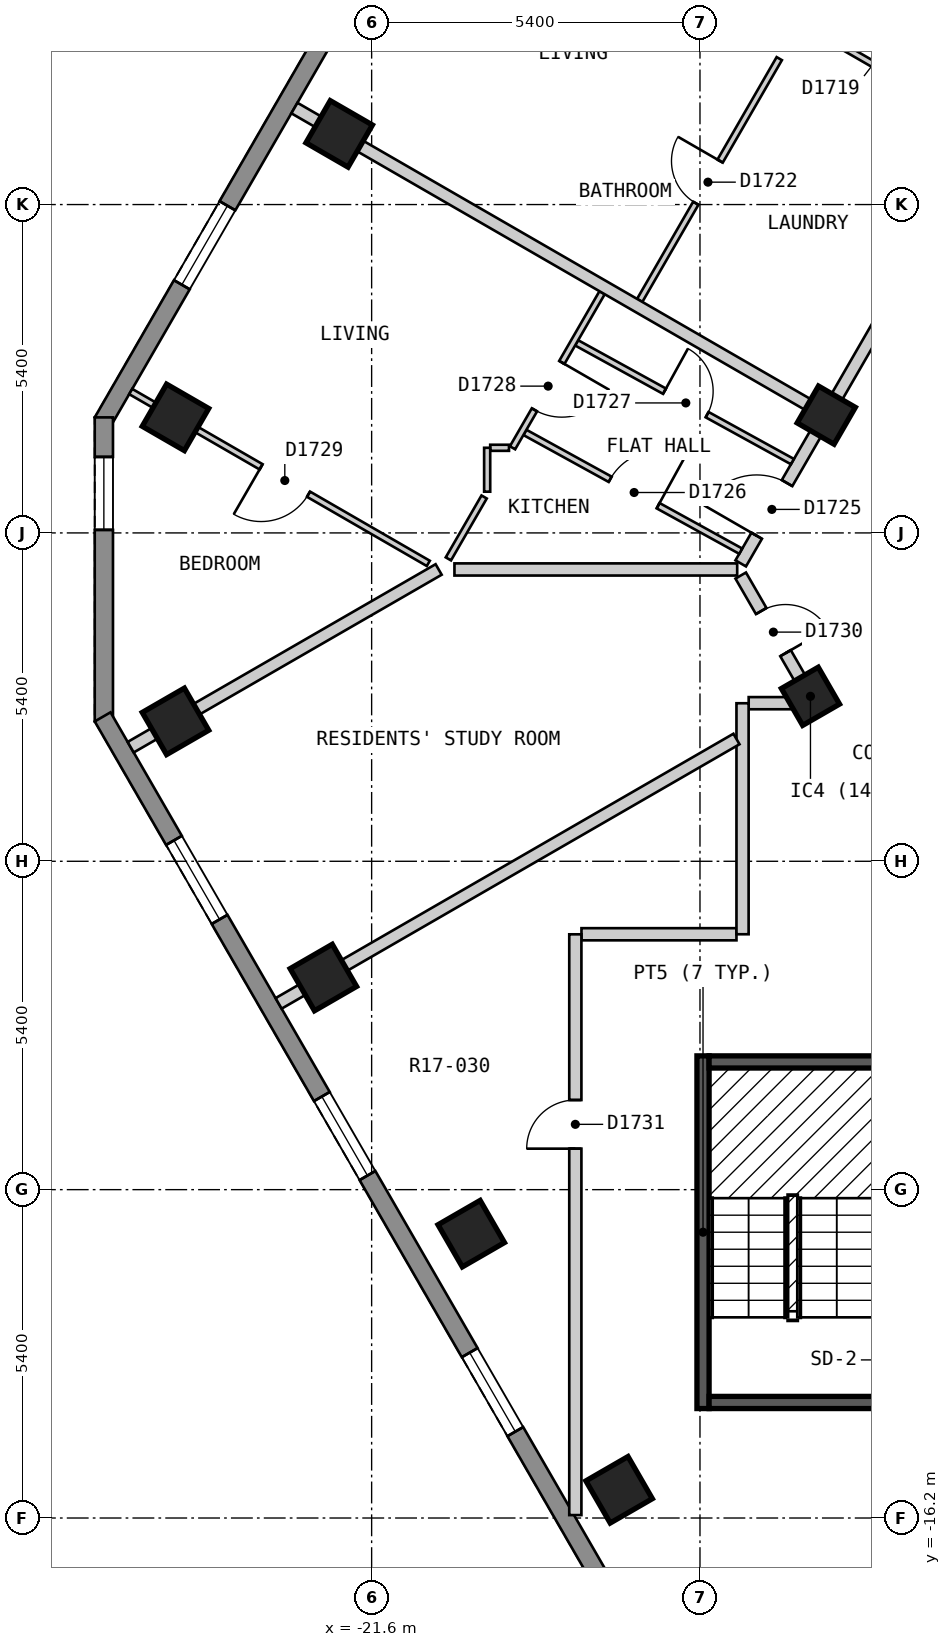
"""IFC4 building model, lengths in metres.
Left out: names, types, materials, properties, quantities, classifications, styles, units other than length and angle.
Written with IfcOpenShell. Run it as: python <this file> out.ifc"""

import sys

from ifc_helpers import new_model, si_unit, direction, frame, frame_2d, origin, origin_2d, place, context, subcontext, project, spatial, polyline, rectangle, outline, extrude, element, fill, save


model = new_model("IFC4")
c1 = context("Model", 3, precision=1e-05, world=origin(), true_north=direction((0.0, 1.0)))
c2 = subcontext(c1, "Body", "Model", "MODEL_VIEW")
j1 = project(units=[si_unit("LENGTHUNIT", "METRE"), si_unit("PLANEANGLEUNIT", "RADIAN")], contexts=[c1])
p1 = place(None, origin())
s1 = spatial("IfcSite", under=j1, at=p1, CompositionType="ELEMENT")
p2 = place(p1, origin())
s2 = spatial("IfcBuilding", under=s1, at=p2, CompositionType="ELEMENT")
p3 = place(p2, frame((0.0, 0.0, 187.2)))
s3 = spatial("IfcBuildingStorey", under=s2, at=p3, CompositionType="ELEMENT", Elevation=187.2)
for number, where, z_axis, x_axis in (
    (1, (-22.134, 6.562, 0.0), (0.0, 0.0, 1.0), (-0.5, -0.866, 0.0)),
    (2, (-24.826, 1.9, 0.0), (0.0, 0.0, 1.0), (-0.5, -0.866, 0.0)),
    (3, (-24.826, -3.099, 0.0), (0.0, 0.0, 1.0), (0.5, -0.866, 0.0)),
    (4, (-22.394, -7.312, 0.0), (0.0, 0.0, 1.0), (0.5, -0.866, 0.0)),
    (5, (-19.962, -11.524, 0.0), (0.0, 0.0, 1.0), (0.5, -0.866, 0.0)),
    (6, (-17.53, -15.736, 0.0), (0.0, 0.0, 1.0), (0.5, -0.866, 0.0)),
):
    element("IfcColumn", number, at=place(p3, frame(where, z_axis=z_axis, x_axis=x_axis)), inside=s3, PredefinedType="COLUMN", context=c2, shape_type="SweptSolid", body=[
        extrude(rectangle(XDim=0.8, YDim=0.8, at=origin_2d()), origin(), (0.0, 0.0, 1.0), 3.0),
    ])
for number, where, z_axis, x_axis in (
    (7, (-14.383, -2.687, 0.0), (0.0, 0.0, 1.0), (0.5, -0.866, 0.0)),
    (8, (-14.123, 1.937, 0.0), (0.0, 0.0, 1.0), (-0.5, -0.866, 0.0)),
):
    element("IfcColumn", number, at=place(p3, frame(where, z_axis=z_axis, x_axis=x_axis)), inside=s3, PredefinedType="COLUMN", context=c2, shape_type="SweptSolid", body=[
        extrude(rectangle(XDim=0.7, YDim=0.7, at=origin_2d()), origin(), (0.0, 0.0, 1.0), 3.0),
    ])
p4 = place(p3, frame((-14.592, 21.625, 0.0), z_axis=(0.0, 0.0, 1.0), x_axis=(-0.500010537973, -0.866019319597, 0.0)))
e9 = element("IfcWall", 9, at=p4, inside=s3, PredefinedType="SOLIDWALL", context=c2, shape_type="SweptSolid", body=[
    extrude(outline(polyline([(0.0, -0.15), (22.863, -0.15), (22.783, 0.15), (0.08, 0.15), (0.0, -0.15)])), origin(), (0.0, 0.0, 1.0), 2.7),
])
p5 = place(p4, frame((2.606, 0.0, 0.15)))
e10 = element("IfcOpeningElement", 10, at=p5, cuts=e9, PredefinedType="OPENING", context=c2, shape_type="SweptSolid", body=[
    extrude(rectangle(XDim=1.5, YDim=2.1, at=frame_2d((0.75, 1.05))), frame((0.0, 0.16, 0.0), z_axis=(0.0, -1.0, 0.0), x_axis=(1.0, 0.0, 0.0)), (0.0, 0.0, 1.0), 0.32),
])
p6 = place(p4, frame((7.99, 0.0, 0.15)))
e11 = element("IfcOpeningElement", 11, at=p6, cuts=e9, PredefinedType="OPENING", context=c2, shape_type="SweptSolid", body=[
    extrude(rectangle(XDim=1.5, YDim=2.1, at=frame_2d((0.75, 1.05))), frame((0.0, 0.16, 0.0), z_axis=(0.0, -1.0, 0.0), x_axis=(1.0, 0.0, 0.0)), (0.0, 0.0, 1.0), 0.32),
])
p7 = place(p4, frame((13.373, 0.0, 0.15)))
e12 = element("IfcOpeningElement", 12, at=p7, cuts=e9, PredefinedType="OPENING", context=c2, shape_type="SweptSolid", body=[
    extrude(rectangle(XDim=1.5, YDim=2.1, at=frame_2d((0.75, 1.05))), frame((0.0, 0.16, 0.0), z_axis=(0.0, -1.0, 0.0), x_axis=(1.0, 0.0, 0.0)), (0.0, 0.0, 1.0), 0.32),
])
p8 = place(p4, frame((18.758, 0.0, 0.15)))
e13 = element("IfcOpeningElement", 13, at=p8, cuts=e9, PredefinedType="OPENING", context=c2, shape_type="SweptSolid", body=[
    extrude(rectangle(XDim=1.5, YDim=2.1, at=frame_2d((0.75, 1.05))), frame((0.0, 0.16, 0.0), z_axis=(0.0, -1.0, 0.0), x_axis=(1.0, 0.0, 0.0)), (0.0, 0.0, 1.0), 0.32),
])
p9 = place(p3, frame((-26.004, 1.9, 0.0), z_axis=(0.0, 0.0, 1.0), x_axis=(0.0, -1.0, 0.0)))
e14 = element("IfcWall", 14, at=p9, inside=s3, PredefinedType="SOLIDWALL", context=c2, shape_type="SweptSolid", body=[
    extrude(outline(polyline([(0.0, -0.15), (5.0, -0.15), (4.92, 0.15), (0.08, 0.15), (0.0, -0.15)])), origin(), (0.0, 0.0, 1.0), 2.7),
])
p10 = place(p9, frame((0.65, 0.0, 0.15)))
e15 = element("IfcOpeningElement", 15, at=p10, cuts=e14, PredefinedType="OPENING", context=c2, shape_type="SweptSolid", body=[
    extrude(rectangle(XDim=1.2, YDim=2.1, at=frame_2d((0.6, 1.05))), frame((0.0, 0.16, 0.0), z_axis=(0.0, -1.0, 0.0), x_axis=(1.0, 0.0, 0.0)), (0.0, 0.0, 1.0), 0.32),
])
p11 = place(p3, frame((-26.024, -3.025, 0.0), z_axis=(0.0, 0.0, 1.0), x_axis=(0.500018670445, -0.86601462413, 0.0)))
e16 = element("IfcWall", 16, at=p11, inside=s3, PredefinedType="SOLIDWALL", context=c2, shape_type="SweptSolid", body=[
    extrude(outline(polyline([(0.0, -0.15), (20.785, -0.15), (20.705, 0.15), (0.08, 0.15), (0.0, -0.15)])), origin(), (0.0, 0.0, 1.0), 2.7),
])
p12 = place(p11, frame((2.346, 0.0, 0.15)))
e17 = element("IfcOpeningElement", 17, at=p12, cuts=e16, PredefinedType="OPENING", context=c2, shape_type="SweptSolid", body=[
    extrude(rectangle(XDim=1.5, YDim=2.1, at=frame_2d((0.75, 1.05))), frame((0.0, 0.16, 0.0), z_axis=(0.0, -1.0, 0.0), x_axis=(1.0, 0.0, 0.0)), (0.0, 0.0, 1.0), 0.32),
])
p13 = place(p11, frame((7.21, 0.0, 0.15)))
e18 = element("IfcOpeningElement", 18, at=p13, cuts=e16, PredefinedType="OPENING", context=c2, shape_type="SweptSolid", body=[
    extrude(rectangle(XDim=1.5, YDim=2.1, at=frame_2d((0.75, 1.05))), frame((0.0, 0.16, 0.0), z_axis=(0.0, -1.0, 0.0), x_axis=(1.0, 0.0, 0.0)), (0.0, 0.0, 1.0), 0.32),
])
p14 = place(p11, frame((12.073, 0.0, 0.15)))
e19 = element("IfcOpeningElement", 19, at=p14, cuts=e16, PredefinedType="OPENING", context=c2, shape_type="SweptSolid", body=[
    extrude(rectangle(XDim=1.5, YDim=2.1, at=frame_2d((0.75, 1.05))), frame((0.0, 0.16, 0.0), z_axis=(0.0, -1.0, 0.0), x_axis=(1.0, 0.0, 0.0)), (0.0, 0.0, 1.0), 0.32),
])
p15 = place(p11, frame((16.938, 0.0, 0.15)))
e20 = element("IfcOpeningElement", 20, at=p15, cuts=e16, PredefinedType="OPENING", context=c2, shape_type="SweptSolid", body=[
    extrude(rectangle(XDim=1.5, YDim=2.1, at=frame_2d((0.75, 1.05))), frame((0.0, 0.16, 0.0), z_axis=(0.0, -1.0, 0.0), x_axis=(1.0, 0.0, 0.0)), (0.0, 0.0, 1.0), 0.32),
])
p16 = place(p3, frame((-15.53, -0.701, 0.0), z_axis=(0.0, 0.0, 1.0), x_axis=(0.499972710878, -0.866041158593, 0.0)))
e21 = element("IfcWall", 21, at=p16, inside=s3, PredefinedType="PARTITIONING", context=c2, shape_type="SweptSolid", body=[
    extrude(rectangle(XDim=2.308, YDim=0.2, at=frame_2d((1.154, 0.0))), origin(), (0.0, 0.0, 1.0), 2.7),
])
p17 = place(p16, frame((0.674, 0.0, 0.0)))
e22 = element("IfcOpeningElement", 22, at=p17, cuts=e21, PredefinedType="OPENING", context=c2, shape_type="SweptSolid", body=[
    extrude(rectangle(XDim=0.8, YDim=2.1, at=frame_2d((0.4, 1.05))), frame((0.0, 0.11, 0.0), z_axis=(0.0, -1.0, 0.0), x_axis=(1.0, 0.0, 0.0)), (0.0, 0.0, 1.0), 0.22),
])
p18 = place(p3, frame((-18.149, -6.6, 0.0), z_axis=(0.0, 0.0, 1.0), x_axis=(1.0, 0.0, 0.0)))
e23 = element("IfcWall", 23, at=p18, inside=s3, PredefinedType="PARTITIONING", context=c2, shape_type="SweptSolid", body=[
    extrude(rectangle(XDim=2.549, YDim=0.2, at=frame_2d((1.274, 0.0))), origin(), (0.0, 0.0, 1.0), 2.7),
])
p19 = place(p3, frame((-15.399, -2.8, 0.0), z_axis=(0.0, 0.0, 1.0), x_axis=(1.0, 0.0, 0.0)))
e24 = element("IfcWall", 24, at=p19, inside=s3, PredefinedType="PARTITIONING", context=c2, shape_type="SweptSolid", body=[
    extrude(rectangle(XDim=1.081, YDim=0.2, at=frame_2d((0.541, 0.0))), origin(), (0.0, 0.0, 1.0), 2.7),
])
p20 = place(p3, frame((-15.53, -0.501, 0.0), z_axis=(0.0, 0.0, 1.0), x_axis=(0.499952498232, 0.866052827206, 0.0)))
e25 = element("IfcWall", 25, at=p20, inside=s3, PredefinedType="PARTITIONING", context=c2, shape_type="SweptSolid", body=[
    extrude(rectangle(XDim=9.585, YDim=0.2, at=frame_2d((4.792, 0.0))), origin(), (0.0, 0.0, 1.0), 2.7),
])
p21 = place(p20, frame((0.525, 0.0, 0.0)))
e26 = element("IfcOpeningElement", 26, at=p21, cuts=e25, PredefinedType="OPENING", context=c2, shape_type="SweptSolid", body=[
    extrude(rectangle(XDim=1.0, YDim=2.1, at=frame_2d((0.5, 1.05))), frame((0.0, 0.11, 0.0), z_axis=(0.0, -1.0, 0.0), x_axis=(1.0, 0.0, 0.0)), (0.0, 0.0, 1.0), 0.22),
])
p22 = place(p3, frame((-15.5, -6.6, 0.0), z_axis=(0.0, 0.0, 1.0), x_axis=(0.0, 1.0, 0.0)))
e27 = element("IfcWall", 27, at=p22, inside=s3, PredefinedType="PARTITIONING", context=c2, shape_type="SweptSolid", body=[
    extrude(rectangle(XDim=3.799, YDim=0.2, at=frame_2d((1.899, 0.0))), origin(), (0.0, 0.0, 1.0), 2.7),
])
p23 = place(p3, frame((-18.25, -16.152, 0.0), z_axis=(0.0, 0.0, 1.0), x_axis=(0.0, 1.0, 0.0)))
e28 = element("IfcWall", 28, at=p23, inside=s3, PredefinedType="PARTITIONING", context=c2, shape_type="SweptSolid", body=[
    extrude(rectangle(XDim=9.551, YDim=0.2, at=frame_2d((4.775, 0.0))), origin(), (0.0, 0.0, 1.0), 2.7),
])
p24 = place(p23, frame((6.026, 0.0, 0.0)))
e29 = element("IfcOpeningElement", 29, at=p24, cuts=e28, PredefinedType="OPENING", context=c2, shape_type="SweptSolid", body=[
    extrude(rectangle(XDim=0.8, YDim=2.1, at=frame_2d((0.4, 1.05))), frame((0.0, 0.11, 0.0), z_axis=(0.0, -1.0, 0.0), x_axis=(1.0, 0.0, 0.0)), (0.0, 0.0, 1.0), 0.22),
])
p25 = place(p3, frame((-18.229, 3.126, 0.0), z_axis=(0.0, 0.0, 1.0), x_axis=(0.876123002581, -0.482087631399, 0.0)))
e30 = element("IfcWall", 30, at=p25, inside=s3, PredefinedType="PARTITIONING", context=c2, shape_type="SweptSolid", body=[
    extrude(rectangle(XDim=4.051, YDim=0.1, at=frame_2d((2.025, 0.0))), origin(), (0.0, 0.0, 1.0), 2.7),
])
p26 = place(p25, frame((1.65, 0.0, 0.0)))
e31 = element("IfcOpeningElement", 31, at=p26, cuts=e30, PredefinedType="OPENING", context=c2, shape_type="SweptSolid", body=[
    extrude(rectangle(XDim=0.8, YDim=2.1, at=frame_2d((0.4, 1.05))), frame((0.0, 0.06, 0.0), z_axis=(0.0, -1.0, 0.0), x_axis=(1.0, 0.0, 0.0)), (0.0, 0.0, 1.0), 0.12),
])
p27 = place(p3, frame((-19.079, 1.653, 0.0), z_axis=(0.0, 0.0, 1.0), x_axis=(0.876097546615, -0.482133890963, 0.0)))
e32 = element("IfcWall", 32, at=p27, inside=s3, PredefinedType="PARTITIONING", context=c2, shape_type="SweptSolid", body=[
    extrude(rectangle(XDim=4.051, YDim=0.1, at=frame_2d((2.025, 0.0))), origin(), (0.0, 0.0, 1.0), 2.7),
])
p28 = place(p27, frame((1.6, 0.0, 0.0)))
e33 = element("IfcOpeningElement", 33, at=p28, cuts=e32, PredefinedType="OPENING", context=c2, shape_type="SweptSolid", body=[
    extrude(rectangle(XDim=0.9, YDim=2.1, at=frame_2d((0.45, 1.05))), frame((0.0, 0.06, 0.0), z_axis=(0.0, -1.0, 0.0), x_axis=(1.0, 0.0, 0.0)), (0.0, 0.0, 1.0), 0.12),
])
p29 = place(p3, frame((-25.562, 2.325, 0.0), z_axis=(0.0, 0.0, 1.0), x_axis=(0.865998530728, -0.500046542611, 0.0)))
e34 = element("IfcWall", 34, at=p29, inside=s3, PredefinedType="PARTITIONING", context=c2, shape_type="SweptSolid", body=[
    extrude(rectangle(XDim=5.651, YDim=0.1, at=frame_2d((2.826, 0.0))), origin(), (0.0, 0.0, 1.0), 2.7),
])
p30 = place(p29, frame((2.476, 0.0, 0.0)))
e35 = element("IfcOpeningElement", 35, at=p30, cuts=e34, PredefinedType="OPENING", context=c2, shape_type="SweptSolid", body=[
    extrude(rectangle(XDim=0.9, YDim=2.1, at=frame_2d((0.45, 1.05))), frame((0.0, 0.06, 0.0), z_axis=(0.0, -1.0, 0.0), x_axis=(1.0, 0.0, 0.0)), (0.0, 0.0, 1.0), 0.12),
])
p31 = place(p3, frame((-14.679, 8.475, 0.0), z_axis=(0.0, 0.0, 1.0), x_axis=(0.865995104784, -0.500052475737, 0.0)))
e36 = element("IfcWall", 36, at=p31, inside=s3, PredefinedType="PARTITIONING", context=c2, shape_type="SweptSolid", body=[
    extrude(rectangle(XDim=3.65, YDim=0.1, at=frame_2d((1.825, 0.0))), origin(), (0.0, 0.0, 1.0), 2.7),
])
p32 = place(p3, frame((-19.65, 1.4, 0.0), z_axis=(0.0, 0.0, 1.0), x_axis=(1.0, 0.0, 0.0)))
e37 = element("IfcWall", 37, at=p32, inside=s3, PredefinedType="PARTITIONING", context=c2, shape_type="SweptSolid", body=[
    extrude(rectangle(XDim=0.309, YDim=0.1, at=frame_2d((0.154, 0.0))), origin(), (0.0, 0.0, 1.0), 2.7),
])
p33 = place(p3, frame((-17.191, 3.824, 0.0), z_axis=(0.0, 0.0, 1.0), x_axis=(0.499891250406, 0.866088181288, 0.0)))
e38 = element("IfcWall", 38, at=p33, inside=s3, PredefinedType="PARTITIONING", context=c2, shape_type="SweptSolid", body=[
    extrude(rectangle(XDim=4.591, YDim=0.1, at=frame_2d((2.295, 0.0))), origin(), (0.0, 0.0, 1.0), 2.7),
])
p34 = place(p33, frame((1.845, 0.0, 0.0)))
e39 = element("IfcOpeningElement", 39, at=p34, cuts=e38, PredefinedType="OPENING", context=c2, shape_type="SweptSolid", body=[
    extrude(rectangle(XDim=0.8, YDim=2.1, at=frame_2d((0.4, 1.05))), frame((0.0, 0.06, 0.0), z_axis=(0.0, -1.0, 0.0), x_axis=(1.0, 0.0, 0.0)), (0.0, 0.0, 1.0), 0.12),
])
p35 = place(p3, frame((-20.338, -0.427, 0.0), z_axis=(0.0, 0.0, 1.0), x_axis=(0.500069990121, 0.865984991198, 0.0)))
e40 = element("IfcWall", 40, at=p35, inside=s3, PredefinedType="PARTITIONING", context=c2, shape_type="SweptSolid", body=[
    extrude(rectangle(XDim=1.176, YDim=0.1, at=frame_2d((0.588, 0.0))), origin(), (0.0, 0.0, 1.0), 2.7),
])
p36 = place(p3, frame((-19.283, 1.4, 0.0), z_axis=(0.0, 0.0, 1.0), x_axis=(0.500160189342, 0.865932898669, 0.0)))
e41 = element("IfcWall", 41, at=p36, inside=s3, PredefinedType="PARTITIONING", context=c2, shape_type="SweptSolid", body=[
    extrude(rectangle(XDim=2.945, YDim=0.1, at=frame_2d((1.472, 0.0))), origin(), (0.0, 0.0, 1.0), 2.7),
])
p37 = place(p36, frame((0.721, 0.0, 0.0)))
e42 = element("IfcOpeningElement", 42, at=p37, cuts=e41, PredefinedType="OPENING", context=c2, shape_type="SweptSolid", body=[
    extrude(rectangle(XDim=0.9, YDim=2.1, at=frame_2d((0.45, 1.05))), frame((0.0, 0.06, 0.0), z_axis=(0.0, -1.0, 0.0), x_axis=(1.0, 0.0, 0.0)), (0.0, 0.0, 1.0), 0.12),
])
p38 = place(p3, frame((-19.7, 0.678, 0.0), z_axis=(0.0, 0.0, 1.0), x_axis=(0.0, 1.0, 0.0)))
e43 = element("IfcWall", 43, at=p38, inside=s3, PredefinedType="PARTITIONING", context=c2, shape_type="SweptSolid", body=[
    extrude(rectangle(XDim=0.722, YDim=0.1, at=frame_2d((0.361, 0.0))), origin(), (0.0, 0.0, 1.0), 2.7),
])
p39 = place(p3, frame((-22.87, 6.987, 0.0), z_axis=(0.0, 0.0, 1.0), x_axis=(0.866022959057, -0.500004234368, 0.0)))
e44 = element("IfcWall", 44, at=p39, inside=s3, PredefinedType="PARTITIONING", context=c2, shape_type="SweptSolid", body=[
    extrude(rectangle(XDim=10.0, YDim=0.2, at=frame_2d((5.0, 0.0))), origin(), (0.0, 0.0, 1.0), 2.7),
])
p40 = place(p3, frame((-20.238, -0.601, 0.0), z_axis=(0.0, 0.0, 1.0), x_axis=(1.0, 0.0, 0.0)))
e45 = element("IfcWall", 45, at=p40, inside=s3, PredefinedType="PARTITIONING", context=c2, shape_type="SweptSolid", body=[
    extrude(rectangle(XDim=4.65, YDim=0.2, at=frame_2d((2.325, 0.0))), origin(), (0.0, 0.0, 1.0), 2.7),
])
p41 = place(p3, frame((-23.13, -7.737, 0.0), z_axis=(0.0, 0.0, 1.0), x_axis=(0.86598451299, 0.500070818246, 0.0)))
e46 = element("IfcWall", 46, at=p41, inside=s3, PredefinedType="PARTITIONING", context=c2, shape_type="SweptSolid", body=[
    extrude(rectangle(XDim=8.695, YDim=0.2, at=frame_2d((4.348, 0.0))), origin(), (0.0, 0.0, 1.0), 2.7),
])
p42 = place(p3, frame((-25.563, -3.524, 0.0), z_axis=(0.0, 0.0, 1.0), x_axis=(0.866128586522, 0.499821239653, 0.0)))
e47 = element("IfcWall", 47, at=p42, inside=s3, PredefinedType="PARTITIONING", context=c2, shape_type="SweptSolid", body=[
    extrude(rectangle(XDim=5.848, YDim=0.2, at=frame_2d((2.924, 0.0))), origin(), (0.0, 0.0, 1.0), 2.7),
])
p43 = place(p3, frame((-16.15, -14.4, 0.0), z_axis=(0.0, 0.0, 1.0), x_axis=(0.0, 1.0, 0.0)))
e48 = element("IfcWall", 48, at=p43, inside=s3, PredefinedType="SOLIDWALL", context=c2, shape_type="SweptSolid", body=[
    extrude(rectangle(XDim=5.8, YDim=0.2, at=frame_2d((2.9, 0.0))), origin(), (0.0, 0.0, 1.0), 2.7),
])
for number, where, z_axis, x_axis in (
    (49, (-16.05, -14.3, 0.0), (0.0, 0.0, 1.0), (1.0, 0.0, 0.0)),
    (50, (-16.05, -8.7, 0.0), (0.0, 0.0, 1.0), (1.0, 0.0, 0.0)),
):
    element("IfcWall", number, at=place(p3, frame(where, z_axis=z_axis, x_axis=x_axis)), inside=s3, PredefinedType="SOLIDWALL", context=c2, shape_type="SweptSolid", body=[
        extrude(rectangle(XDim=2.75, YDim=0.2, at=frame_2d((1.375, 0.0))), origin(), (0.0, 0.0, 1.0), 2.7),
    ])
p44 = place(p8, origin())
e51 = element("IfcWindow", 51, at=p44, inside=s3, PartitioningType="SINGLE_PANEL", PredefinedType="WINDOW", context=c2, shape_type="SweptSolid", body=[
    extrude(rectangle(XDim=1.5, YDim=2.1, at=frame_2d((0.75, 1.05))), frame((0.0, 0.03, 0.0), z_axis=(0.0, -1.0, 0.0), x_axis=(1.0, 0.0, 0.0)), (0.0, 0.0, 1.0), 0.06),
])
fill(e13, e51)
p45 = place(p10, origin())
e52 = element("IfcWindow", 52, at=p45, inside=s3, PartitioningType="SINGLE_PANEL", PredefinedType="WINDOW", context=c2, shape_type="SweptSolid", body=[
    extrude(rectangle(XDim=1.2, YDim=2.1, at=frame_2d((0.6, 1.05))), frame((0.0, 0.03, 0.0), z_axis=(0.0, -1.0, 0.0), x_axis=(1.0, 0.0, 0.0)), (0.0, 0.0, 1.0), 0.06),
])
fill(e15, e52)
p46 = place(p12, origin())
e53 = element("IfcWindow", 53, at=p46, inside=s3, PartitioningType="SINGLE_PANEL", PredefinedType="WINDOW", context=c2, shape_type="SweptSolid", body=[
    extrude(rectangle(XDim=1.5, YDim=2.1, at=frame_2d((0.75, 1.05))), frame((0.0, 0.03, 0.0), z_axis=(0.0, -1.0, 0.0), x_axis=(1.0, 0.0, 0.0)), (0.0, 0.0, 1.0), 0.06),
])
fill(e17, e53)
p47 = place(p13, origin())
e54 = element("IfcWindow", 54, at=p47, inside=s3, PartitioningType="SINGLE_PANEL", PredefinedType="WINDOW", context=c2, shape_type="SweptSolid", body=[
    extrude(rectangle(XDim=1.5, YDim=2.1, at=frame_2d((0.75, 1.05))), frame((0.0, 0.03, 0.0), z_axis=(0.0, -1.0, 0.0), x_axis=(1.0, 0.0, 0.0)), (0.0, 0.0, 1.0), 0.06),
])
fill(e18, e54)
p48 = place(p14, origin())
e55 = element("IfcWindow", 55, at=p48, inside=s3, PartitioningType="SINGLE_PANEL", PredefinedType="WINDOW", context=c2, shape_type="SweptSolid", body=[
    extrude(rectangle(XDim=1.5, YDim=2.1, at=frame_2d((0.75, 1.05))), frame((0.0, 0.03, 0.0), z_axis=(0.0, -1.0, 0.0), x_axis=(1.0, 0.0, 0.0)), (0.0, 0.0, 1.0), 0.06),
])
fill(e19, e55)
p49 = place(p34, origin())
e56 = element("IfcDoor", 56, at=p49, inside=s3, OperationType="SINGLE_SWING_RIGHT", PredefinedType="DOOR", context=c2, shape_type="SweptSolid", body=[
    extrude(rectangle(XDim=0.8, YDim=2.1, at=frame_2d((0.4, 1.05))), frame((0.0, 0.025, 0.0), z_axis=(0.0, -1.0, 0.0), x_axis=(1.0, 0.0, 0.0)), (0.0, 0.0, 1.0), 0.05),
])
fill(e39, e56)
p50 = place(p21, origin())
e57 = element("IfcDoor", 57, at=p50, inside=s3, OperationType="SINGLE_SWING_LEFT", PredefinedType="DOOR", context=c2, shape_type="SweptSolid", body=[
    extrude(rectangle(XDim=1.0, YDim=2.1, at=frame_2d((0.5, 1.05))), frame((0.0, 0.025, 0.0), z_axis=(0.0, -1.0, 0.0), x_axis=(1.0, 0.0, 0.0)), (0.0, 0.0, 1.0), 0.05),
])
fill(e26, e57)
p51 = place(p28, origin())
e58 = element("IfcDoor", 58, at=p51, inside=s3, OperationType="SINGLE_SWING_RIGHT", PredefinedType="DOOR", context=c2, shape_type="SweptSolid", body=[
    extrude(rectangle(XDim=0.9, YDim=2.1, at=frame_2d((0.45, 1.05))), frame((0.0, 0.025, 0.0), z_axis=(0.0, -1.0, 0.0), x_axis=(1.0, 0.0, 0.0)), (0.0, 0.0, 1.0), 0.05),
])
fill(e33, e58)
p52 = place(p26, origin())
e59 = element("IfcDoor", 59, at=p52, inside=s3, OperationType="SINGLE_SWING_LEFT", PredefinedType="DOOR", context=c2, shape_type="SweptSolid", body=[
    extrude(rectangle(XDim=0.8, YDim=2.1, at=frame_2d((0.4, 1.05))), frame((0.0, 0.025, 0.0), z_axis=(0.0, -1.0, 0.0), x_axis=(1.0, 0.0, 0.0)), (0.0, 0.0, 1.0), 0.05),
])
fill(e31, e59)
p53 = place(p37, origin())
e60 = element("IfcDoor", 60, at=p53, inside=s3, OperationType="SINGLE_SWING_RIGHT", PredefinedType="DOOR", context=c2, shape_type="SweptSolid", body=[
    extrude(rectangle(XDim=0.9, YDim=2.1, at=frame_2d((0.45, 1.05))), frame((0.0, 0.025, 0.0), z_axis=(0.0, -1.0, 0.0), x_axis=(1.0, 0.0, 0.0)), (0.0, 0.0, 1.0), 0.05),
])
fill(e42, e60)
p54 = place(p30, origin())
e61 = element("IfcDoor", 61, at=p54, inside=s3, OperationType="SINGLE_SWING_LEFT", PredefinedType="DOOR", context=c2, shape_type="SweptSolid", body=[
    extrude(rectangle(XDim=0.9, YDim=2.1, at=frame_2d((0.45, 1.05))), frame((0.0, 0.025, 0.0), z_axis=(0.0, -1.0, 0.0), x_axis=(1.0, 0.0, 0.0)), (0.0, 0.0, 1.0), 0.05),
])
fill(e35, e61)
p55 = place(p17, origin())
e62 = element("IfcDoor", 62, at=p55, inside=s3, OperationType="SINGLE_SWING_RIGHT", PredefinedType="DOOR", context=c2, shape_type="SweptSolid", body=[
    extrude(rectangle(XDim=0.8, YDim=2.1, at=frame_2d((0.4, 1.05))), frame((0.0, 0.025, 0.0), z_axis=(0.0, -1.0, 0.0), x_axis=(1.0, 0.0, 0.0)), (0.0, 0.0, 1.0), 0.05),
])
fill(e22, e62)
p56 = place(p24, origin())
e63 = element("IfcDoor", 63, at=p56, inside=s3, OperationType="SINGLE_SWING_LEFT", PredefinedType="DOOR", context=c2, shape_type="SweptSolid", body=[
    extrude(rectangle(XDim=0.8, YDim=2.1, at=frame_2d((0.4, 1.05))), frame((0.0, 0.025, 0.0), z_axis=(0.0, -1.0, 0.0), x_axis=(1.0, 0.0, 0.0)), (0.0, 0.0, 1.0), 0.05),
])
fill(e29, e63)
save(model, sys.argv[1])
